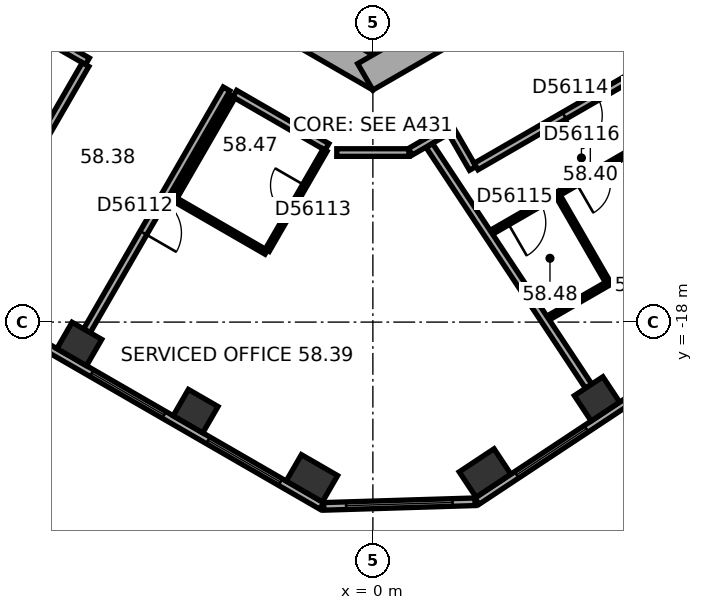
"""IFC4 building model, lengths in metres.
Left out: names, types, materials, properties, quantities, classifications, styles, units other than length and angle.
Written with IfcOpenShell. Run it as: python <this file> out.ifc"""

import sys

from ifc_helpers import new_model, si_unit, direction, frame, frame_2d, origin, origin_2d, place, context, subcontext, project, spatial, rectangle, extrude, element, fill, save


model = new_model("IFC4")
c1 = context("Model", 3, precision=1e-05, world=origin(), true_north=direction((0.0, 1.0)))
c2 = subcontext(c1, "Body", "Model", "MODEL_VIEW")
j1 = project(units=[si_unit("LENGTHUNIT", "METRE"), si_unit("PLANEANGLEUNIT", "RADIAN")], contexts=[c1])
p1 = place(None, origin())
s1 = spatial("IfcSite", under=j1, at=p1, CompositionType="ELEMENT")
p2 = place(p1, origin())
s2 = spatial("IfcBuilding", under=s1, at=p2, CompositionType="ELEMENT")
p3 = place(p2, frame((0.0, 0.0, 236.5)))
s3 = spatial("IfcBuildingStorey", under=s2, at=p3, CompositionType="ELEMENT", Elevation=236.5)
for number, where, z_axis, x_axis in (
    (1, (-7.725, -18.576, 0.0), (0.0, 0.0, 1.0), (0.866, -0.5, 0.0)),
    (2, (-4.665, -20.343, 0.0), (0.0, 0.0, 1.0), (0.866, -0.5, 0.0)),
):
    element("IfcColumn", number, at=place(p3, frame(where, z_axis=z_axis, x_axis=x_axis)), inside=s3, PredefinedType="COLUMN", context=c2, shape_type="SweptSolid", body=[
        extrude(rectangle(XDim=0.9, YDim=0.8, at=origin_2d()), origin(), (0.0, 0.0, 1.0), 3.7),
    ])
for number, where, z_axis, x_axis in (
    (3, (-1.604, -22.11, 0.0), (0.0, 0.0, 1.0), (0.866, -0.5, 0.0)),
    (4, (2.951, -21.971, 0.0), (0.0, 0.0, 1.0), (0.834, 0.552, 0.0)),
):
    element("IfcColumn", number, at=place(p3, frame(where, z_axis=z_axis, x_axis=x_axis)), inside=s3, PredefinedType="COLUMN", context=c2, shape_type="SweptSolid", body=[
        extrude(rectangle(XDim=1.1, YDim=0.8, at=origin_2d()), origin(), (0.0, 0.0, 1.0), 3.7),
    ])
p4 = place(p3, frame((5.898, -20.021, 0.0), z_axis=(0.0, 0.0, 1.0), x_axis=(0.833885822067, 0.551936985312, 0.0)))
e5 = element("IfcColumn", 5, at=p4, inside=s3, PredefinedType="COLUMN", context=c2, shape_type="SweptSolid", body=[
    extrude(rectangle(XDim=0.9, YDim=0.8, at=origin_2d()), origin(), (0.0, 0.0, 1.0), 3.7),
])
p5 = place(p3, frame((-10.1, -5.6, 0.0), z_axis=(0.0, 0.0, 1.0), x_axis=(0.866023897231, -0.500002609418, 0.0)))
e6 = element("IfcWall", 6, at=p5, inside=s3, PredefinedType="SHEAR", context=c2, shape_type="SweptSolid", body=[
    extrude(rectangle(XDim=11.894, YDim=0.8, at=frame_2d((5.947, 0.0))), origin(), (0.0, 0.0, 1.0), 3.7),
])
p6 = place(p5, frame((6.147, 0.0, 0.0)))
e7 = element("IfcOpeningElement", 7, at=p6, cuts=e6, PredefinedType="OPENING", context=c2, shape_type="SweptSolid", body=[
    extrude(rectangle(XDim=1.5, YDim=2.1, at=frame_2d((0.75, 1.05))), frame((0.0, 0.41, 0.0), z_axis=(0.0, -1.0, 0.0), x_axis=(1.0, 0.0, 0.0)), (0.0, 0.0, 1.0), 0.82),
])
p7 = place(p5, frame((1.597, 0.0, 0.0)))
e8 = element("IfcOpeningElement", 8, at=p7, cuts=e6, PredefinedType="OPENING", context=c2, shape_type="SweptSolid", body=[
    extrude(rectangle(XDim=1.1, YDim=2.1, at=frame_2d((0.55, 1.05))), frame((0.0, 0.41, 0.0), z_axis=(0.0, -1.0, 0.0), x_axis=(1.0, 0.0, 0.0)), (0.0, 0.0, 1.0), 0.82),
])
p8 = place(p5, frame((4.197, 0.0, 0.0)))
e9 = element("IfcOpeningElement", 9, at=p8, cuts=e6, PredefinedType="OPENING", context=c2, shape_type="SweptSolid", body=[
    extrude(rectangle(XDim=1.1, YDim=2.1, at=frame_2d((0.55, 1.05))), frame((0.0, 0.41, 0.0), z_axis=(0.0, -1.0, 0.0), x_axis=(1.0, 0.0, 0.0)), (0.0, 0.0, 1.0), 0.82),
])
p9 = place(p3, frame((-0.2, -11.547, 0.0), z_axis=(0.0, 0.0, 1.0), x_axis=(0.866023897231, 0.500002609418, 0.0)))
e10 = element("IfcWall", 10, at=p9, inside=s3, PredefinedType="SHEAR", context=c2, shape_type="SweptSolid", body=[
    extrude(rectangle(XDim=11.894, YDim=0.8, at=frame_2d((5.947, 0.0))), origin(), (0.0, 0.0, 1.0), 3.7),
])
p10 = place(p9, frame((2.497, 0.0, 0.0)))
e11 = element("IfcOpeningElement", 11, at=p10, cuts=e10, PredefinedType="OPENING", context=c2, shape_type="SweptSolid", body=[
    extrude(rectangle(XDim=1.1, YDim=2.1, at=frame_2d((0.55, 1.05))), frame((0.0, 0.41, 0.0), z_axis=(0.0, -1.0, 0.0), x_axis=(1.0, 0.0, 0.0)), (0.0, 0.0, 1.0), 0.82),
])
p11 = place(p9, frame((5.097, 0.0, 0.0)))
e12 = element("IfcOpeningElement", 12, at=p11, cuts=e10, PredefinedType="OPENING", context=c2, shape_type="SweptSolid", body=[
    extrude(rectangle(XDim=1.1, YDim=2.1, at=frame_2d((0.55, 1.05))), frame((0.0, 0.41, 0.0), z_axis=(0.0, -1.0, 0.0), x_axis=(1.0, 0.0, 0.0)), (0.0, 0.0, 1.0), 0.82),
])
p12 = place(p9, frame((7.697, 0.0, 0.0)))
e13 = element("IfcOpeningElement", 13, at=p12, cuts=e10, PredefinedType="OPENING", context=c2, shape_type="SweptSolid", body=[
    extrude(rectangle(XDim=1.1, YDim=2.1, at=frame_2d((0.55, 1.05))), frame((0.0, 0.41, 0.0), z_axis=(0.0, -1.0, 0.0), x_axis=(1.0, 0.0, 0.0)), (0.0, 0.0, 1.0), 0.82),
])
p13 = place(p3, frame((-17.664, -13.415, 0.0), z_axis=(0.0, 0.0, 1.0), x_axis=(0.866026555358, -0.49999800541, 0.0)))
e14 = element("IfcWall", 14, at=p13, inside=s3, PredefinedType="STANDARD", context=c2, shape_type="SweptSolid", body=[
    extrude(rectangle(XDim=18.841, YDim=0.2, at=frame_2d((9.421, 0.0))), origin(), (0.0, 0.0, 1.0), 3.7),
])
p14 = place(p13, frame((1.254, 0.0, 0.9)))
e15 = element("IfcOpeningElement", 15, at=p14, cuts=e14, PredefinedType="OPENING", context=c2, shape_type="SweptSolid", body=[
    extrude(rectangle(XDim=2.2, YDim=2.0, at=frame_2d((1.1, 1.0))), frame((0.0, 0.11, 0.0), z_axis=(0.0, -1.0, 0.0), x_axis=(1.0, 0.0, 0.0)), (0.0, 0.0, 1.0), 0.22),
])
p15 = place(p13, frame((4.788, 0.0, 0.9)))
e16 = element("IfcOpeningElement", 16, at=p15, cuts=e14, PredefinedType="OPENING", context=c2, shape_type="SweptSolid", body=[
    extrude(rectangle(XDim=2.2, YDim=2.0, at=frame_2d((1.1, 1.0))), frame((0.0, 0.11, 0.0), z_axis=(0.0, -1.0, 0.0), x_axis=(1.0, 0.0, 0.0)), (0.0, 0.0, 1.0), 0.22),
])
p16 = place(p13, frame((8.322, 0.0, 0.9)))
e17 = element("IfcOpeningElement", 17, at=p16, cuts=e14, PredefinedType="OPENING", context=c2, shape_type="SweptSolid", body=[
    extrude(rectangle(XDim=2.2, YDim=2.0, at=frame_2d((1.1, 1.0))), frame((0.0, 0.11, 0.0), z_axis=(0.0, -1.0, 0.0), x_axis=(1.0, 0.0, 0.0)), (0.0, 0.0, 1.0), 0.22),
])
p17 = place(p13, frame((11.855, 0.0, 0.9)))
e18 = element("IfcOpeningElement", 18, at=p17, cuts=e14, PredefinedType="OPENING", context=c2, shape_type="SweptSolid", body=[
    extrude(rectangle(XDim=2.2, YDim=2.0, at=frame_2d((1.1, 1.0))), frame((0.0, 0.11, 0.0), z_axis=(0.0, -1.0, 0.0), x_axis=(1.0, 0.0, 0.0)), (0.0, 0.0, 1.0), 0.22),
])
p18 = place(p13, frame((15.389, 0.0, 0.9)))
e19 = element("IfcOpeningElement", 19, at=p18, cuts=e14, PredefinedType="OPENING", context=c2, shape_type="SweptSolid", body=[
    extrude(rectangle(XDim=2.2, YDim=2.0, at=frame_2d((1.1, 1.0))), frame((0.0, 0.11, 0.0), z_axis=(0.0, -1.0, 0.0), x_axis=(1.0, 0.0, 0.0)), (0.0, 0.0, 1.0), 0.22),
])
p19 = place(p3, frame((-1.294, -22.849, 0.0), z_axis=(0.0, 0.0, 1.0), x_axis=(0.999533952558, 0.030526671678, 0.0)))
e20 = element("IfcWall", 20, at=p19, inside=s3, PredefinedType="STANDARD", context=c2, shape_type="SweptSolid", body=[
    extrude(rectangle(XDim=3.983, YDim=0.2, at=frame_2d((1.991, 0.0))), origin(), (0.0, 0.0, 1.0), 3.7),
])
p20 = place(p19, frame((0.591, 0.0, 0.9)))
e21 = element("IfcOpeningElement", 21, at=p20, cuts=e20, PredefinedType="OPENING", context=c2, shape_type="SweptSolid", body=[
    extrude(rectangle(XDim=2.8, YDim=2.0, at=frame_2d((1.4, 1.0))), frame((0.0, 0.11, 0.0), z_axis=(0.0, -1.0, 0.0), x_axis=(1.0, 0.0, 0.0)), (0.0, 0.0, 1.0), 0.22),
])
p21 = place(p3, frame((2.739, -22.711, 0.0), z_axis=(0.0, 0.0, 1.0), x_axis=(0.833885723098, 0.551937134838, 0.0)))
e22 = element("IfcWall", 22, at=p21, inside=s3, PredefinedType="STANDARD", context=c2, shape_type="SweptSolid", body=[
    extrude(rectangle(XDim=18.841, YDim=0.2, at=frame_2d((9.421, 0.0))), origin(), (0.0, 0.0, 1.0), 3.7),
])
p22 = place(p21, frame((1.252, 0.0, 0.9)))
e23 = element("IfcOpeningElement", 23, at=p22, cuts=e22, PredefinedType="OPENING", context=c2, shape_type="SweptSolid", body=[
    extrude(rectangle(XDim=2.2, YDim=2.0, at=frame_2d((1.1, 1.0))), frame((0.0, 0.11, 0.0), z_axis=(0.0, -1.0, 0.0), x_axis=(1.0, 0.0, 0.0)), (0.0, 0.0, 1.0), 0.22),
])
p23 = place(p21, frame((4.786, 0.0, 0.9)))
e24 = element("IfcOpeningElement", 24, at=p23, cuts=e22, PredefinedType="OPENING", context=c2, shape_type="SweptSolid", body=[
    extrude(rectangle(XDim=2.2, YDim=2.0, at=frame_2d((1.1, 1.0))), frame((0.0, 0.11, 0.0), z_axis=(0.0, -1.0, 0.0), x_axis=(1.0, 0.0, 0.0)), (0.0, 0.0, 1.0), 0.22),
])
p24 = place(p21, frame((8.32, 0.0, 0.9)))
e25 = element("IfcOpeningElement", 25, at=p24, cuts=e22, PredefinedType="OPENING", context=c2, shape_type="SweptSolid", body=[
    extrude(rectangle(XDim=2.2, YDim=2.0, at=frame_2d((1.1, 1.0))), frame((0.0, 0.11, 0.0), z_axis=(0.0, -1.0, 0.0), x_axis=(1.0, 0.0, 0.0)), (0.0, 0.0, 1.0), 0.22),
])
p25 = place(p21, frame((11.854, 0.0, 0.9)))
e26 = element("IfcOpeningElement", 26, at=p25, cuts=e22, PredefinedType="OPENING", context=c2, shape_type="SweptSolid", body=[
    extrude(rectangle(XDim=2.2, YDim=2.0, at=frame_2d((1.1, 1.0))), frame((0.0, 0.11, 0.0), z_axis=(0.0, -1.0, 0.0), x_axis=(1.0, 0.0, 0.0)), (0.0, 0.0, 1.0), 0.22),
])
p26 = place(p21, frame((15.387, 0.0, 0.9)))
e27 = element("IfcOpeningElement", 27, at=p26, cuts=e22, PredefinedType="OPENING", context=c2, shape_type="SweptSolid", body=[
    extrude(rectangle(XDim=2.2, YDim=2.0, at=frame_2d((1.1, 1.0))), frame((0.0, 0.11, 0.0), z_axis=(0.0, -1.0, 0.0), x_axis=(1.0, 0.0, 0.0)), (0.0, 0.0, 1.0), 0.22),
])
p27 = place(p3, frame((-11.551, -8.805, 0.0), z_axis=(0.0, 0.0, 1.0), x_axis=(0.866038310922, -0.499977643516, 0.0)))
e28 = element("IfcWall", 28, at=p27, inside=s3, PredefinedType="PARTITIONING", context=c2, shape_type="SweptSolid", body=[
    extrude(rectangle(XDim=4.665, YDim=0.2, at=frame_2d((2.333, 0.0))), origin(), (0.0, 0.0, 1.0), 3.42),
])
p28 = place(p3, frame((-10.585, -16.463, 0.0), z_axis=(0.0, 0.0, 1.0), x_axis=(0.499993802756, 0.866028981735, 0.0)))
e29 = element("IfcWall", 29, at=p28, inside=s3, PredefinedType="PARTITIONING", context=c2, shape_type="SweptSolid", body=[
    extrude(rectangle(XDim=6.049, YDim=0.2, at=frame_2d((3.024, 0.0))), origin(), (0.0, 0.0, 1.0), 2.87),
])
p29 = place(p28, frame((2.524, 0.0, 0.0)))
e30 = element("IfcOpeningElement", 30, at=p29, cuts=e29, PredefinedType="OPENING", context=c2, shape_type="SweptSolid", body=[
    extrude(rectangle(XDim=1.0, YDim=2.1, at=frame_2d((0.5, 1.05))), frame((0.0, 0.11, 0.0), z_axis=(0.0, -1.0, 0.0), x_axis=(1.0, 0.0, 0.0)), (0.0, 0.0, 1.0), 0.22),
])
p30 = place(p3, frame((-7.525, -18.23, 0.0), z_axis=(0.0, 0.0, 1.0), x_axis=(0.499983153418, 0.866035129944, 0.0)))
e31 = element("IfcWall", 31, at=p30, inside=s3, PredefinedType="PARTITIONING", context=c2, shape_type="SweptSolid", body=[
    extrude(rectangle(XDim=7.35, YDim=0.2, at=frame_2d((3.675, 0.0))), origin(), (0.0, 0.0, 1.0), 3.42),
])
p31 = place(p30, frame((2.975, 0.0, 0.0)))
e32 = element("IfcOpeningElement", 32, at=p31, cuts=e31, PredefinedType="OPENING", context=c2, shape_type="SweptSolid", body=[
    extrude(rectangle(XDim=1.0, YDim=2.1, at=frame_2d((0.5, 1.05))), frame((0.0, 0.11, 0.0), z_axis=(0.0, -1.0, 0.0), x_axis=(1.0, 0.0, 0.0)), (0.0, 0.0, 1.0), 0.22),
])
p32 = place(p3, frame((-5.233, -14.761, 0.0), z_axis=(0.0, 0.0, 1.0), x_axis=(0.499967891604, 0.866043940782, 0.0)))
e33 = element("IfcWall", 33, at=p32, inside=s3, PredefinedType="PARTITIONING", context=c2, shape_type="SweptSolid", body=[
    extrude(rectangle(XDim=3.1, YDim=0.12, at=frame_2d((1.55, 0.0))), origin(), (0.0, 0.0, 1.0), 3.42),
])
p33 = place(p3, frame((-3.634, -11.99, 0.0), z_axis=(0.0, 0.0, 1.0), x_axis=(0.866018616679, -0.500011755427, 0.0)))
e34 = element("IfcWall", 34, at=p33, inside=s3, PredefinedType="PARTITIONING", context=c2, shape_type="SweptSolid", body=[
    extrude(rectangle(XDim=2.8, YDim=0.2, at=frame_2d((1.4, 0.0))), origin(), (0.0, 0.0, 1.0), 3.42),
])
p34 = place(p3, frame((-2.809, -16.161, 0.0), z_axis=(0.0, 0.0, 1.0), x_axis=(-0.865997131366, 0.500048966069, 0.0)))
e35 = element("IfcWall", 35, at=p34, inside=s3, PredefinedType="PARTITIONING", context=c2, shape_type="SweptSolid", body=[
    extrude(rectangle(XDim=2.74, YDim=0.12, at=frame_2d((1.37, 0.0))), origin(), (0.0, 0.0, 1.0), 3.42),
])
p35 = place(p3, frame((-1.259, -13.476, 0.0), z_axis=(0.0, 0.0, 1.0), x_axis=(-0.500026023896, -0.86601037836, 0.0)))
e36 = element("IfcWall", 36, at=p35, inside=s3, PredefinedType="PARTITIONING", context=c2, shape_type="SweptSolid", body=[
    extrude(rectangle(XDim=3.04, YDim=0.12, at=frame_2d((1.52, 0.0))), origin(), (0.0, 0.0, 1.0), 3.42),
])
p36 = place(p35, frame((1.07, 0.0, 0.0)))
e37 = element("IfcOpeningElement", 37, at=p36, cuts=e36, PredefinedType="OPENING", context=c2, shape_type="SweptSolid", body=[
    extrude(rectangle(XDim=0.9, YDim=2.1, at=frame_2d((0.45, 1.05))), frame((0.0, 0.07, 0.0), z_axis=(0.0, -1.0, 0.0), x_axis=(1.0, 0.0, 0.0)), (0.0, 0.0, 1.0), 0.14),
])
p37 = place(p3, frame((-0.95, -13.539, 0.0), z_axis=(0.0, 0.0, 1.0), x_axis=(1.0, 0.0, 0.0)))
e38 = element("IfcWall", 38, at=p37, inside=s3, PredefinedType="PARTITIONING", context=c2, shape_type="SweptSolid", body=[
    extrude(rectangle(XDim=1.9, YDim=0.2, at=frame_2d((0.95, 0.0))), origin(), (0.0, 0.0, 1.0), 3.42),
])
p38 = place(p3, frame((0.985, -13.519, 0.0), z_axis=(0.0, 0.0, 1.0), x_axis=(0.866054082991, 0.499950322867, 0.0)))
e39 = element("IfcWall", 39, at=p38, inside=s3, PredefinedType="PARTITIONING", context=c2, shape_type="SweptSolid", body=[
    extrude(rectangle(XDim=1.206, YDim=0.2, at=frame_2d((0.603, 0.0))), origin(), (0.0, 0.0, 1.0), 3.42),
])
p39 = place(p3, frame((2.079, -13.003, 0.0), z_axis=(0.0, 0.0, 1.0), x_axis=(0.500074377092, -0.865982457891, 0.0)))
e40 = element("IfcWall", 40, at=p39, inside=s3, PredefinedType="PARTITIONING", context=c2, shape_type="SweptSolid", body=[
    extrude(rectangle(XDim=1.101, YDim=0.2, at=frame_2d((0.55, 0.0))), origin(), (0.0, 0.0, 1.0), 3.42),
])
p40 = place(p3, frame((2.716, -13.906, 0.0), z_axis=(0.0, 0.0, 1.0), x_axis=(0.866040290674, 0.499974214264, 0.0)))
e41 = element("IfcWall", 41, at=p40, inside=s3, PredefinedType="PARTITIONING", context=c2, shape_type="SweptSolid", body=[
    extrude(rectangle(XDim=8.702, YDim=0.2, at=frame_2d((4.351, 0.0))), origin(), (0.0, 0.0, 1.0), 3.42),
])
p41 = place(p40, frame((2.679, 0.0, 0.0)))
e42 = element("IfcOpeningElement", 42, at=p41, cuts=e41, PredefinedType="OPENING", context=c2, shape_type="SweptSolid", body=[
    extrude(rectangle(XDim=1.0, YDim=2.1, at=frame_2d((0.5, 1.05))), frame((0.0, 0.11, 0.0), z_axis=(0.0, -1.0, 0.0), x_axis=(1.0, 0.0, 0.0)), (0.0, 0.0, 1.0), 0.22),
])
p42 = place(p3, frame((3.117, -15.638, 0.0), z_axis=(0.0, 0.0, 1.0), x_axis=(0.866031365477, 0.499989673903, 0.0)))
e43 = element("IfcWall", 43, at=p42, inside=s3, PredefinedType="PARTITIONING", context=c2, shape_type="SweptSolid", body=[
    extrude(rectangle(XDim=6.881, YDim=0.12, at=frame_2d((3.44, 0.0))), origin(), (0.0, 0.0, 1.0), 3.42),
])
p43 = place(p42, frame((0.5, 0.0, 0.0)))
e44 = element("IfcOpeningElement", 44, at=p43, cuts=e43, PredefinedType="OPENING", context=c2, shape_type="SweptSolid", body=[
    extrude(rectangle(XDim=1.0, YDim=2.1, at=frame_2d((0.5, 1.05))), frame((0.0, 0.07, 0.0), z_axis=(0.0, -1.0, 0.0), x_axis=(1.0, 0.0, 0.0)), (0.0, 0.0, 1.0), 0.14),
])
p44 = place(p42, frame((2.583, 0.0, 0.0)))
e45 = element("IfcOpeningElement", 45, at=p44, cuts=e43, PredefinedType="OPENING", context=c2, shape_type="SweptSolid", body=[
    extrude(rectangle(XDim=0.9, YDim=2.1, at=frame_2d((0.45, 1.05))), frame((0.0, 0.07, 0.0), z_axis=(0.0, -1.0, 0.0), x_axis=(1.0, 0.0, 0.0)), (0.0, 0.0, 1.0), 0.14),
])
p45 = place(p42, frame((5.023, 0.0, 0.0)))
e46 = element("IfcOpeningElement", 46, at=p45, cuts=e43, PredefinedType="OPENING", context=c2, shape_type="SweptSolid", body=[
    extrude(rectangle(XDim=0.9, YDim=2.1, at=frame_2d((0.45, 1.05))), frame((0.0, 0.07, 0.0), z_axis=(0.0, -1.0, 0.0), x_axis=(1.0, 0.0, 0.0)), (0.0, 0.0, 1.0), 0.14),
])
p46 = place(p3, frame((4.61, -17.893, 0.0), z_axis=(0.0, 0.0, 1.0), x_axis=(0.866023842607, 0.500002704028, 0.0)))
e47 = element("IfcWall", 47, at=p46, inside=s3, PredefinedType="PARTITIONING", context=c2, shape_type="SweptSolid", body=[
    extrude(rectangle(XDim=1.835, YDim=0.12, at=frame_2d((0.917, 0.0))), origin(), (0.0, 0.0, 1.0), 3.42),
])
p47 = place(p3, frame((5.677, -19.687, 0.0), z_axis=(0.0, 0.0, 1.0), x_axis=(-0.551936619203, 0.833886064389, 0.0)))
e48 = element("IfcWall", 48, at=p47, inside=s3, PredefinedType="PARTITIONING", context=c2, shape_type="SweptSolid", body=[
    extrude(rectangle(XDim=7.592, YDim=0.2, at=frame_2d((3.796, 0.0))), origin(), (0.0, 0.0, 1.0), 3.42),
])
p48 = place(p3, frame((6.169, -16.924, 0.0), z_axis=(0.0, 0.0, 1.0), x_axis=(-0.500047388771, 0.865998042136, 0.0)))
e49 = element("IfcWall", 49, at=p48, inside=s3, PredefinedType="PARTITIONING", context=c2, shape_type="SweptSolid", body=[
    extrude(rectangle(XDim=2.58, YDim=0.12, at=frame_2d((1.29, 0.0))), origin(), (0.0, 0.0, 1.0), 3.42),
])
p49 = place(p17, origin())
e50 = element("IfcWindow", 50, at=p49, inside=s3, PartitioningType="SINGLE_PANEL", PredefinedType="WINDOW", context=c2, shape_type="SweptSolid", body=[
    extrude(rectangle(XDim=2.2, YDim=2.0, at=frame_2d((1.1, 1.0))), frame((0.0, 0.03, 0.0), z_axis=(0.0, -1.0, 0.0), x_axis=(1.0, 0.0, 0.0)), (0.0, 0.0, 1.0), 0.06),
])
fill(e18, e50)
p50 = place(p18, origin())
e51 = element("IfcWindow", 51, at=p50, inside=s3, PartitioningType="SINGLE_PANEL", PredefinedType="WINDOW", context=c2, shape_type="SweptSolid", body=[
    extrude(rectangle(XDim=2.2, YDim=2.0, at=frame_2d((1.1, 1.0))), frame((0.0, 0.03, 0.0), z_axis=(0.0, -1.0, 0.0), x_axis=(1.0, 0.0, 0.0)), (0.0, 0.0, 1.0), 0.06),
])
fill(e19, e51)
p51 = place(p20, origin())
e52 = element("IfcWindow", 52, at=p51, inside=s3, PartitioningType="SINGLE_PANEL", PredefinedType="WINDOW", context=c2, shape_type="SweptSolid", body=[
    extrude(rectangle(XDim=2.8, YDim=2.0, at=frame_2d((1.4, 1.0))), frame((0.0, 0.03, 0.0), z_axis=(0.0, -1.0, 0.0), x_axis=(1.0, 0.0, 0.0)), (0.0, 0.0, 1.0), 0.06),
])
fill(e21, e52)
p52 = place(p22, origin())
e53 = element("IfcWindow", 53, at=p52, inside=s3, PartitioningType="SINGLE_PANEL", PredefinedType="WINDOW", context=c2, shape_type="SweptSolid", body=[
    extrude(rectangle(XDim=2.2, YDim=2.0, at=frame_2d((1.1, 1.0))), frame((0.0, 0.03, 0.0), z_axis=(0.0, -1.0, 0.0), x_axis=(1.0, 0.0, 0.0)), (0.0, 0.0, 1.0), 0.06),
])
fill(e23, e53)
p53 = place(p31, origin())
e54 = element("IfcDoor", 54, at=p53, inside=s3, OperationType="SINGLE_SWING_LEFT", PredefinedType="DOOR", context=c2, shape_type="SweptSolid", body=[
    extrude(rectangle(XDim=1.0, YDim=2.1, at=frame_2d((0.5, 1.05))), frame((0.0, 0.025, 0.0), z_axis=(0.0, -1.0, 0.0), x_axis=(1.0, 0.0, 0.0)), (0.0, 0.0, 1.0), 0.05),
])
fill(e32, e54)
p54 = place(p36, origin())
e55 = element("IfcDoor", 55, at=p54, inside=s3, OperationType="SINGLE_SWING_LEFT", PredefinedType="DOOR", context=c2, shape_type="SweptSolid", body=[
    extrude(rectangle(XDim=0.9, YDim=2.1, at=frame_2d((0.45, 1.05))), frame((0.0, 0.025, 0.0), z_axis=(0.0, -1.0, 0.0), x_axis=(1.0, 0.0, 0.0)), (0.0, 0.0, 1.0), 0.05),
])
fill(e37, e55)
p55 = place(p41, origin())
e56 = element("IfcDoor", 56, at=p55, inside=s3, OperationType="SINGLE_SWING_LEFT", PredefinedType="DOOR", context=c2, shape_type="SweptSolid", body=[
    extrude(rectangle(XDim=1.0, YDim=2.1, at=frame_2d((0.5, 1.05))), frame((0.0, 0.025, 0.0), z_axis=(0.0, -1.0, 0.0), x_axis=(1.0, 0.0, 0.0)), (0.0, 0.0, 1.0), 0.05),
])
fill(e42, e56)
p56 = place(p43, origin())
e57 = element("IfcDoor", 57, at=p56, inside=s3, OperationType="SINGLE_SWING_LEFT", PredefinedType="DOOR", context=c2, shape_type="SweptSolid", body=[
    extrude(rectangle(XDim=1.0, YDim=2.1, at=frame_2d((0.5, 1.05))), frame((0.0, 0.025, 0.0), z_axis=(0.0, -1.0, 0.0), x_axis=(1.0, 0.0, 0.0)), (0.0, 0.0, 1.0), 0.05),
])
fill(e44, e57)
p57 = place(p44, origin())
e58 = element("IfcDoor", 58, at=p57, inside=s3, OperationType="SINGLE_SWING_LEFT", PredefinedType="DOOR", context=c2, shape_type="SweptSolid", body=[
    extrude(rectangle(XDim=0.9, YDim=2.1, at=frame_2d((0.45, 1.05))), frame((0.0, 0.025, 0.0), z_axis=(0.0, -1.0, 0.0), x_axis=(1.0, 0.0, 0.0)), (0.0, 0.0, 1.0), 0.05),
])
fill(e45, e58)
save(model, sys.argv[1])
